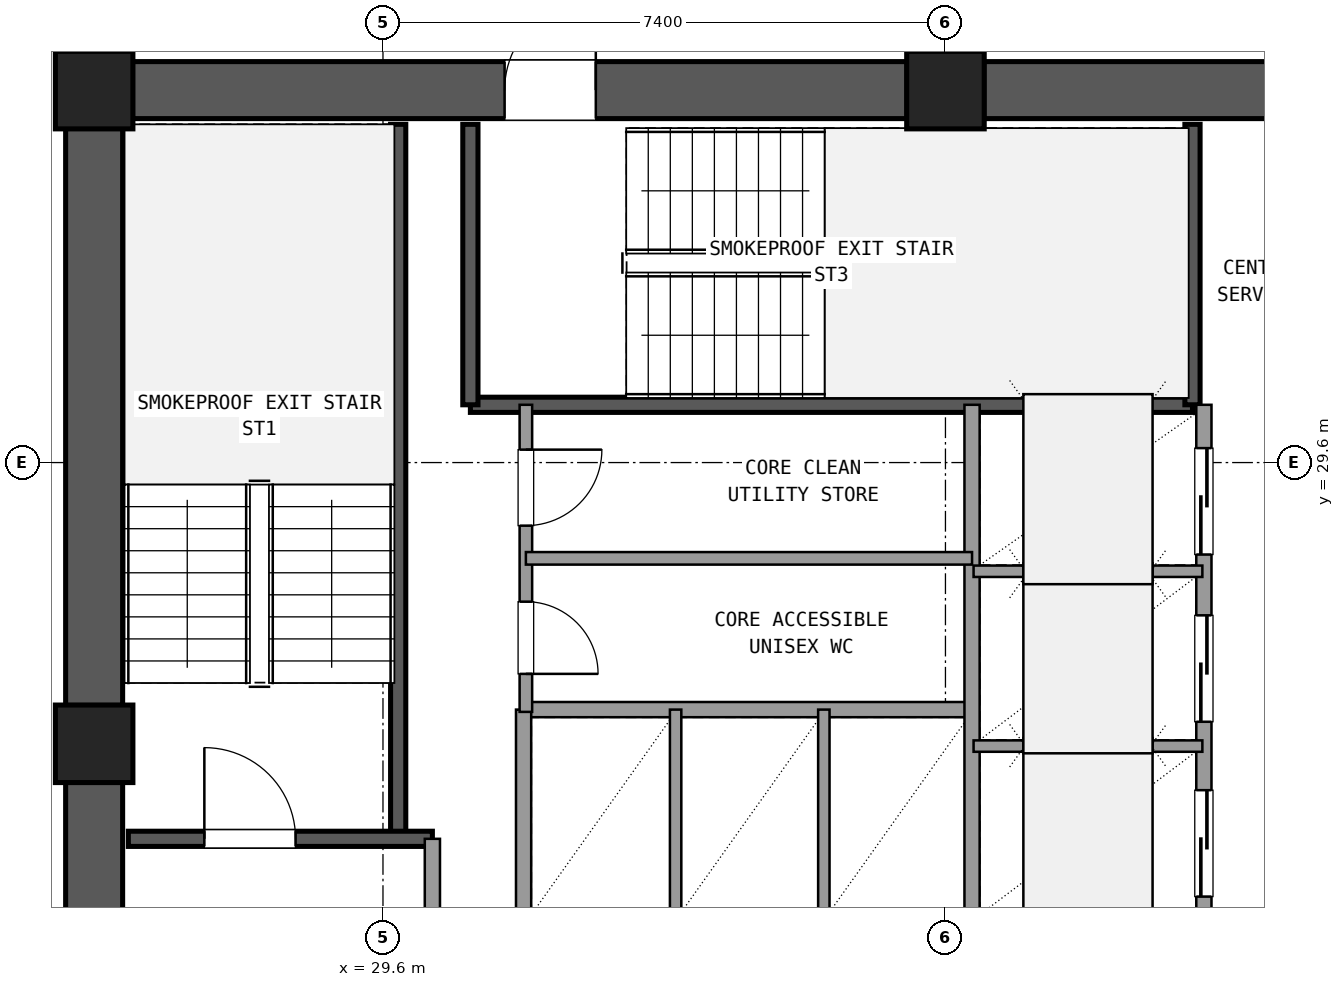
"""IFC4 building model, lengths in metres.
Left out: names, types, materials, properties, quantities, classifications, styles, units other than length and angle.
Written with IfcOpenShell. Run it as: python <this file> out.ifc"""

import sys

from ifc_helpers import new_model, si_unit, direction, frame, frame_2d, origin, origin_2d, place, context, subcontext, project, spatial, rectangle, extrude, element, fill, save


model = new_model("IFC4")
c1 = context("Model", 3, precision=1e-05, world=origin(), true_north=direction((0.0, 1.0)))
c2 = subcontext(c1, "Body", "Model", "MODEL_VIEW")
j1 = project(units=[si_unit("LENGTHUNIT", "METRE"), si_unit("PLANEANGLEUNIT", "RADIAN")], contexts=[c1])
p1 = place(None, origin())
s1 = spatial("IfcSite", under=j1, at=p1, CompositionType="ELEMENT")
p2 = place(p1, origin())
s2 = spatial("IfcBuilding", under=s1, at=p2, CompositionType="ELEMENT")
p3 = place(p2, frame((0.0, 0.0, 99.18)))
s3 = spatial("IfcBuildingStorey", under=s2, at=p3, CompositionType="ELEMENT", Elevation=99.18)
for number, where, z_axis, x_axis in (
    (1, (37.0, 34.5, 0.0), (0.0, 0.0, 1.0), (1.0, 0.0, 0.0)),
    (2, (25.8, 34.5, 0.0), (0.0, 0.0, 1.0), (1.0, 0.0, 0.0)),
    (3, (25.8, 25.9, 0.0), (0.0, 0.0, 1.0), (1.0, 0.0, 0.0)),
):
    element("IfcColumn", number, at=place(p3, frame(where, z_axis=z_axis, x_axis=x_axis)), inside=s3, PredefinedType="COLUMN", context=c2, shape_type="SweptSolid", body=[
        extrude(rectangle(XDim=1.02, YDim=1.02, at=origin_2d()), origin(), (0.0, 0.0, 1.0), 3.6),
    ])
p4 = place(p3, frame((47.695, 34.5, 0.0), z_axis=(0.0, 0.0, 1.0), x_axis=(-1.0, 0.0, 0.0)))
e4 = element("IfcWall", 4, at=p4, inside=s3, PredefinedType="SHEAR", context=c2, shape_type="SweptSolid", body=[
    extrude(rectangle(XDim=10.19, YDim=0.75, at=frame_2d((5.095, 0.0))), origin(), (0.0, 0.0, 1.0), 3.32),
])
p5 = place(p4, frame((4.595, 0.0, 0.0)))
e5 = element("IfcOpeningElement", 5, at=p5, cuts=e4, PredefinedType="OPENING", context=c2, shape_type="SweptSolid", body=[
    extrude(rectangle(XDim=1.6, YDim=2.2, at=frame_2d((0.8, 1.1))), frame((0.0, 0.385, 0.0), z_axis=(0.0, -1.0, 0.0), x_axis=(1.0, 0.0, 0.0)), (0.0, 0.0, 1.0), 0.77),
])
p6 = place(p3, frame((36.495, 34.5, 0.0), z_axis=(0.0, 0.0, 1.0), x_axis=(-1.0, 0.0, 0.0)))
e6 = element("IfcWall", 6, at=p6, inside=s3, PredefinedType="SHEAR", context=c2, shape_type="SweptSolid", body=[
    extrude(rectangle(XDim=10.19, YDim=0.75, at=frame_2d((5.095, 0.0))), origin(), (0.0, 0.0, 1.0), 3.32),
])
p7 = place(p6, frame((4.095, 0.0, 0.0)))
e7 = element("IfcOpeningElement", 7, at=p7, cuts=e6, PredefinedType="OPENING", context=c2, shape_type="SweptSolid", body=[
    extrude(rectangle(XDim=1.2, YDim=2.15, at=frame_2d((0.6, 1.075))), frame((0.0, 0.385, 0.0), z_axis=(0.0, -1.0, 0.0), x_axis=(1.0, 0.0, 0.0)), (0.0, 0.0, 1.0), 0.77),
])
p8 = place(p3, frame((25.8, 33.995, 0.0), z_axis=(0.0, 0.0, 1.0), x_axis=(0.0, -1.0, 0.0)))
e8 = element("IfcWall", 8, at=p8, inside=s3, PredefinedType="SHEAR", context=c2, shape_type="SweptSolid", body=[
    extrude(rectangle(XDim=7.59, YDim=0.75, at=frame_2d((3.795, 0.0))), origin(), (0.0, 0.0, 1.0), 3.32),
])
p9 = place(p3, frame((25.8, 25.395, 0.0), z_axis=(0.0, 0.0, 1.0), x_axis=(0.0, -1.0, 0.0)))
e9 = element("IfcWall", 9, at=p9, inside=s3, PredefinedType="SHEAR", context=c2, shape_type="SweptSolid", body=[
    extrude(rectangle(XDim=7.59, YDim=0.75, at=frame_2d((3.795, 0.0))), origin(), (0.0, 0.0, 1.0), 3.32),
])
p10 = place(p9, frame((2.145, 0.0, 0.0)))
e10 = element("IfcOpeningElement", 10, at=p10, cuts=e9, PredefinedType="OPENING", context=c2, shape_type="SweptSolid", body=[
    extrude(rectangle(XDim=1.2, YDim=2.15, at=frame_2d((0.6, 1.075))), frame((0.0, 0.385, 0.0), z_axis=(0.0, -1.0, 0.0), x_axis=(1.0, 0.0, 0.0)), (0.0, 0.0, 1.0), 0.77),
])
p11 = place(p3, frame((29.8, 24.65, 0.0), z_axis=(0.0, 0.0, 1.0), x_axis=(0.0, 1.0, 0.0)))
e11 = element("IfcWall", 11, at=p11, inside=s3, PredefinedType="SHEAR", context=c2, shape_type="SweptSolid", body=[
    extrude(rectangle(XDim=9.4, YDim=0.2, at=frame_2d((4.7, 0.0))), origin(), (0.0, 0.0, 1.0), 3.32),
])
p12 = place(p3, frame((26.25, 24.65, 0.0), z_axis=(0.0, 0.0, 1.0), x_axis=(1.0, 0.0, 0.0)))
e12 = element("IfcWall", 12, at=p12, inside=s3, PredefinedType="SHEAR", context=c2, shape_type="SweptSolid", body=[
    extrude(rectangle(XDim=4.0, YDim=0.2, at=frame_2d((2.0, 0.0))), origin(), (0.0, 0.0, 1.0), 3.32),
])
p13 = place(p12, frame((1.0, 0.0, 0.0)))
e13 = element("IfcOpeningElement", 13, at=p13, cuts=e12, PredefinedType="OPENING", context=c2, shape_type="SweptSolid", body=[
    extrude(rectangle(XDim=1.2, YDim=2.15, at=frame_2d((0.6, 1.075))), frame((0.0, 0.11, 0.0), z_axis=(0.0, -1.0, 0.0), x_axis=(1.0, 0.0, 0.0)), (0.0, 0.0, 1.0), 0.22),
])
p14 = place(p3, frame((30.75, 30.36, 0.0), z_axis=(0.0, 0.0, 1.0), x_axis=(1.0, 0.0, 0.0)))
e14 = element("IfcWall", 14, at=p14, inside=s3, PredefinedType="SHEAR", context=c2, shape_type="SweptSolid", body=[
    extrude(rectangle(XDim=9.5, YDim=0.2, at=frame_2d((4.75, 0.0))), origin(), (0.0, 0.0, 1.0), 3.32),
])
for number, where, z_axis, x_axis in (
    (15, (30.75, 30.36, 0.0), (0.0, 0.0, 1.0), (0.0, 1.0, 0.0)),
    (16, (40.25, 30.36, 0.0), (0.0, 0.0, 1.0), (0.0, 1.0, 0.0)),
):
    element("IfcWall", number, at=place(p3, frame(where, z_axis=z_axis, x_axis=x_axis)), inside=s3, PredefinedType="SHEAR", context=c2, shape_type="SweptSolid", body=[
        extrude(rectangle(XDim=3.69, YDim=0.2, at=frame_2d((1.845, 0.0))), origin(), (0.0, 0.0, 1.0), 3.32),
    ])
p15 = place(p3, frame((30.25, 17.75, 0.0), z_axis=(0.0, 0.0, 1.0), x_axis=(0.0, 1.0, 0.0)))
e17 = element("IfcWall", 17, at=p15, inside=s3, PredefinedType="SOLIDWALL", context=c2, shape_type="SweptSolid", body=[
    extrude(rectangle(XDim=6.9, YDim=0.2, at=frame_2d((3.45, 0.0))), origin(), (0.0, 0.0, 1.0), 2.61),
])
p16 = place(p15, frame((4.15, 0.0, 0.0)))
e18 = element("IfcOpeningElement", 18, at=p16, cuts=e17, PredefinedType="OPENING", context=c2, shape_type="SweptSolid", body=[
    extrude(rectangle(XDim=1.2, YDim=2.15, at=frame_2d((0.6, 1.075))), frame((0.0, 0.11, 0.0), z_axis=(0.0, -1.0, 0.0), x_axis=(1.0, 0.0, 0.0)), (0.0, 0.0, 1.0), 0.22),
])
p17 = place(p3, frame((31.45, 26.35, 0.0), z_axis=(0.0, 0.0, 1.0), x_axis=(1.0, 0.0, 0.0)))
e19 = element("IfcWall", 19, at=p17, inside=s3, PredefinedType="SOLIDWALL", context=c2, shape_type="SweptSolid", body=[
    extrude(rectangle(XDim=5.9, YDim=0.2, at=frame_2d((2.95, 0.0))), origin(), (0.0, 0.0, 1.0), 2.61),
])
p18 = place(p3, frame((31.45, 23.54, 0.0), z_axis=(0.0, 0.0, 1.0), x_axis=(0.0, 1.0, 0.0)))
e20 = element("IfcWall", 20, at=p18, inside=s3, PredefinedType="SOLIDWALL", context=c2, shape_type="SweptSolid", body=[
    extrude(rectangle(XDim=2.81, YDim=0.2, at=frame_2d((1.405, 0.0))), origin(), (0.0, 0.0, 1.0), 2.61),
])
for number, where, z_axis, x_axis in (
    (21, (33.45, 23.54, 0.0), (0.0, 0.0, 1.0), (0.0, 1.0, 0.0)),
    (22, (35.4, 23.54, 0.0), (0.0, 0.0, 1.0), (0.0, 1.0, 0.0)),
):
    element("IfcWall", number, at=place(p3, frame(where, z_axis=z_axis, x_axis=x_axis)), inside=s3, PredefinedType="PARTITIONING", context=c2, shape_type="SweptSolid", body=[
        extrude(rectangle(XDim=2.81, YDim=0.15, at=frame_2d((1.405, 0.0))), origin(), (0.0, 0.0, 1.0), 2.61),
    ])
p19 = place(p3, frame((37.35, 23.54, 0.0), z_axis=(0.0, 0.0, 1.0), x_axis=(0.0, 1.0, 0.0)))
e23 = element("IfcWall", 23, at=p19, inside=s3, PredefinedType="SOLIDWALL", context=c2, shape_type="SweptSolid", body=[
    extrude(rectangle(XDim=6.82, YDim=0.2, at=frame_2d((3.41, 0.0))), origin(), (0.0, 0.0, 1.0), 2.61),
])
p20 = place(p3, frame((40.4, 23.54, 0.0), z_axis=(0.0, 0.0, 1.0), x_axis=(0.0, 1.0, 0.0)))
e24 = element("IfcWall", 24, at=p20, inside=s3, PredefinedType="SOLIDWALL", context=c2, shape_type="SweptSolid", body=[
    extrude(rectangle(XDim=6.82, YDim=0.2, at=frame_2d((3.41, 0.0))), origin(), (0.0, 0.0, 1.0), 2.61),
])
p21 = place(p20, frame((0.35, 0.0, 0.0)))
e25 = element("IfcOpeningElement", 25, at=p21, cuts=e24, PredefinedType="OPENING", context=c2, shape_type="SweptSolid", body=[
    extrude(rectangle(XDim=1.4, YDim=2.2, at=frame_2d((0.7, 1.1))), frame((0.0, 0.11, 0.0), z_axis=(0.0, -1.0, 0.0), x_axis=(1.0, 0.0, 0.0)), (0.0, 0.0, 1.0), 0.22),
])
p22 = place(p20, frame((2.65, 0.0, 0.0)))
e26 = element("IfcOpeningElement", 26, at=p22, cuts=e24, PredefinedType="OPENING", context=c2, shape_type="SweptSolid", body=[
    extrude(rectangle(XDim=1.4, YDim=2.2, at=frame_2d((0.7, 1.1))), frame((0.0, 0.11, 0.0), z_axis=(0.0, -1.0, 0.0), x_axis=(1.0, 0.0, 0.0)), (0.0, 0.0, 1.0), 0.22),
])
p23 = place(p20, frame((4.85, 0.0, 0.0)))
e27 = element("IfcOpeningElement", 27, at=p23, cuts=e24, PredefinedType="OPENING", context=c2, shape_type="SweptSolid", body=[
    extrude(rectangle(XDim=1.4, YDim=2.2, at=frame_2d((0.7, 1.1))), frame((0.0, 0.11, 0.0), z_axis=(0.0, -1.0, 0.0), x_axis=(1.0, 0.0, 0.0)), (0.0, 0.0, 1.0), 0.22),
])
for number, where, z_axis, x_axis in (
    (28, (37.37, 25.87, 0.0), (0.0, 0.0, 1.0), (1.0, 0.0, 0.0)),
    (29, (37.37, 28.17, 0.0), (0.0, 0.0, 1.0), (1.0, 0.0, 0.0)),
):
    element("IfcWall", number, at=place(p3, frame(where, z_axis=z_axis, x_axis=x_axis)), inside=s3, PredefinedType="PARTITIONING", context=c2, shape_type="SweptSolid", body=[
        extrude(rectangle(XDim=3.01, YDim=0.15, at=frame_2d((1.505, 0.0))), origin(), (0.0, 0.0, 1.0), 2.61),
    ])
p24 = place(p3, frame((31.48, 26.32, 0.0), z_axis=(0.0, 0.0, 1.0), x_axis=(0.0, 1.0, 0.0)))
e30 = element("IfcWall", 30, at=p24, inside=s3, PredefinedType="PLUMBINGWALL", context=c2, shape_type="SweptSolid", body=[
    extrude(rectangle(XDim=4.04, YDim=0.165, at=frame_2d((2.02, 0.0))), origin(), (0.0, 0.0, 1.0), 2.61),
])
p25 = place(p24, frame((0.5, 0.0, 0.0)))
e31 = element("IfcOpeningElement", 31, at=p25, cuts=e30, PredefinedType="OPENING", context=c2, shape_type="SweptSolid", body=[
    extrude(rectangle(XDim=0.95, YDim=2.1, at=frame_2d((0.475, 1.05))), frame((0.0, 0.093, 0.0), z_axis=(0.0, -1.0, 0.0), x_axis=(1.0, 0.0, 0.0)), (0.0, 0.0, 1.0), 0.185),
])
p26 = place(p24, frame((2.45, 0.0, 0.0)))
e32 = element("IfcOpeningElement", 32, at=p26, cuts=e30, PredefinedType="OPENING", context=c2, shape_type="SweptSolid", body=[
    extrude(rectangle(XDim=1.0, YDim=2.15, at=frame_2d((0.5, 1.075))), frame((0.0, 0.093, 0.0), z_axis=(0.0, -1.0, 0.0), x_axis=(1.0, 0.0, 0.0)), (0.0, 0.0, 1.0), 0.185),
])
p27 = place(p3, frame((31.48, 28.34, 0.0), z_axis=(0.0, 0.0, 1.0), x_axis=(1.0, 0.0, 0.0)))
e33 = element("IfcWall", 33, at=p27, inside=s3, PredefinedType="PLUMBINGWALL", context=c2, shape_type="SweptSolid", body=[
    extrude(rectangle(XDim=5.87, YDim=0.165, at=frame_2d((2.935, 0.0))), origin(), (0.0, 0.0, 1.0), 2.61),
])
p28 = place(p3, frame((37.0, 34.95, 0.0), z_axis=(0.0, 0.0, 1.0), x_axis=(0.0, 1.0, 0.0)))
e34 = element("IfcWall", 34, at=p28, inside=s3, PredefinedType="PARTITIONING", context=c2, shape_type="SweptSolid", body=[
    extrude(rectangle(XDim=3.21, YDim=0.18, at=frame_2d((1.605, 0.0))), origin(), (0.0, 0.0, 1.0), 2.61),
])
p29 = place(p28, frame((0.605, 0.0, 0.0)))
e35 = element("IfcOpeningElement", 35, at=p29, cuts=e34, PredefinedType="OPENING", context=c2, shape_type="SweptSolid", body=[
    extrude(rectangle(XDim=2.0, YDim=2.2, at=frame_2d((1.0, 1.1))), frame((0.0, 0.1, 0.0), z_axis=(0.0, -1.0, 0.0), x_axis=(1.0, 0.0, 0.0)), (0.0, 0.0, 1.0), 0.2),
])
p30 = place(p13, origin())
e36 = element("IfcDoor", 36, at=p30, inside=s3, OperationType="SINGLE_SWING_LEFT", PredefinedType="DOOR", context=c2, shape_type="SweptSolid", body=[
    extrude(rectangle(XDim=1.2, YDim=2.15, at=frame_2d((0.6, 1.075))), frame((0.0, 0.025, 0.0), z_axis=(0.0, -1.0, 0.0), x_axis=(1.0, 0.0, 0.0)), (0.0, 0.0, 1.0), 0.05),
])
fill(e13, e36)
p31 = place(p7, frame((1.2, 0.0, 0.0), z_axis=(0.0, 0.0, 1.0), x_axis=(-1.0, 0.0, 0.0)))
e37 = element("IfcDoor", 37, at=p31, inside=s3, OperationType="SINGLE_SWING_LEFT", PredefinedType="DOOR", context=c2, shape_type="SweptSolid", body=[
    extrude(rectangle(XDim=1.2, YDim=2.15, at=frame_2d((0.6, 1.075))), frame((0.0, 0.025, 0.0), z_axis=(0.0, -1.0, 0.0), x_axis=(1.0, 0.0, 0.0)), (0.0, 0.0, 1.0), 0.05),
])
fill(e7, e37)
p32 = place(p21, origin())
e38 = element("IfcDoor", 38, at=p32, inside=s3, OperationType="SLIDING_TO_LEFT", PredefinedType="DOOR", context=c2, shape_type="SweptSolid", body=[
    extrude(rectangle(XDim=1.4, YDim=2.2, at=frame_2d((0.7, 1.1))), frame((0.0, 0.025, 0.0), z_axis=(0.0, -1.0, 0.0), x_axis=(1.0, 0.0, 0.0)), (0.0, 0.0, 1.0), 0.05),
])
fill(e25, e38)
p33 = place(p22, origin())
e39 = element("IfcDoor", 39, at=p33, inside=s3, OperationType="SLIDING_TO_LEFT", PredefinedType="DOOR", context=c2, shape_type="SweptSolid", body=[
    extrude(rectangle(XDim=1.4, YDim=2.2, at=frame_2d((0.7, 1.1))), frame((0.0, 0.025, 0.0), z_axis=(0.0, -1.0, 0.0), x_axis=(1.0, 0.0, 0.0)), (0.0, 0.0, 1.0), 0.05),
])
fill(e26, e39)
p34 = place(p23, origin())
e40 = element("IfcDoor", 40, at=p34, inside=s3, OperationType="SLIDING_TO_RIGHT", PredefinedType="DOOR", context=c2, shape_type="SweptSolid", body=[
    extrude(rectangle(XDim=1.4, YDim=2.2, at=frame_2d((0.7, 1.1))), frame((0.0, 0.025, 0.0), z_axis=(0.0, -1.0, 0.0), x_axis=(1.0, 0.0, 0.0)), (0.0, 0.0, 1.0), 0.05),
])
fill(e27, e40)
p35 = place(p25, frame((0.95, 0.0, 0.0), z_axis=(0.0, 0.0, 1.0), x_axis=(-1.0, 0.0, 0.0)))
e41 = element("IfcDoor", 41, at=p35, inside=s3, OperationType="SINGLE_SWING_LEFT", PredefinedType="DOOR", context=c2, shape_type="SweptSolid", body=[
    extrude(rectangle(XDim=0.95, YDim=2.1, at=frame_2d((0.475, 1.05))), frame((0.0, 0.025, 0.0), z_axis=(0.0, -1.0, 0.0), x_axis=(1.0, 0.0, 0.0)), (0.0, 0.0, 1.0), 0.05),
])
fill(e31, e41)
p36 = place(p26, frame((1.0, 0.0, 0.0), z_axis=(0.0, 0.0, 1.0), x_axis=(-1.0, 0.0, 0.0)))
e42 = element("IfcDoor", 42, at=p36, inside=s3, OperationType="SINGLE_SWING_RIGHT", PredefinedType="DOOR", context=c2, shape_type="SweptSolid", body=[
    extrude(rectangle(XDim=1.0, YDim=2.15, at=frame_2d((0.5, 1.075))), frame((0.0, 0.025, 0.0), z_axis=(0.0, -1.0, 0.0), x_axis=(1.0, 0.0, 0.0)), (0.0, 0.0, 1.0), 0.05),
])
fill(e32, e42)
save(model, sys.argv[1])
